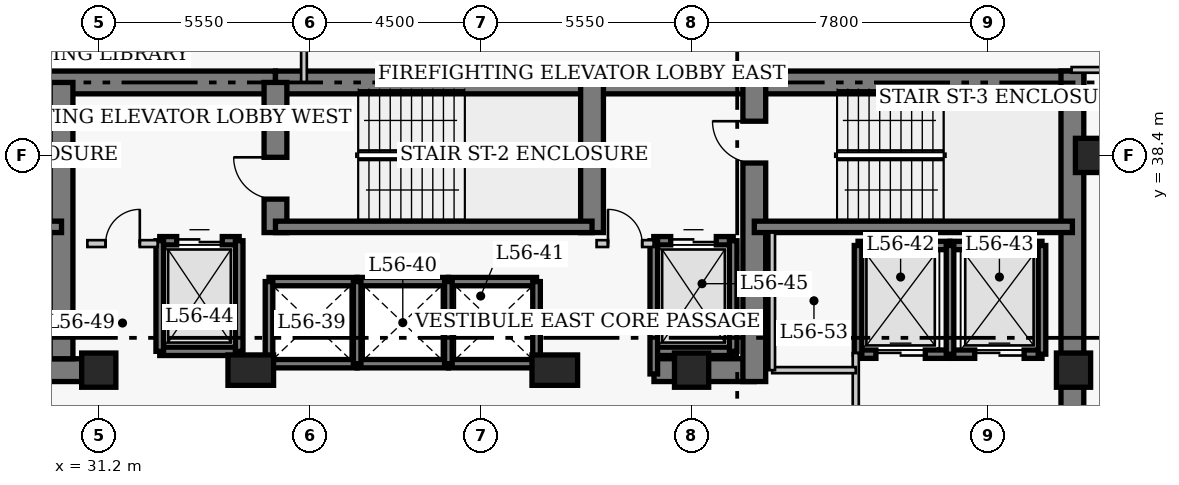
"""IFC4 building model, lengths in metres.
Left out: names, types, materials, properties, quantities, classifications, styles, units other than length and angle.
Written with IfcOpenShell. Run it as: python <this file> out.ifc"""

import sys

from ifc_helpers import new_model, si_unit, direction, frame, frame_2d, origin, origin_2d, place, context, subcontext, project, spatial, rectangle, extrude, element, fill, save


model = new_model("IFC4")
c1 = context("Model", 3, precision=1e-05, world=origin(), true_north=direction((0.0, 1.0)))
c2 = subcontext(c1, "Body", "Model", "MODEL_VIEW")
j1 = project(units=[si_unit("LENGTHUNIT", "METRE"), si_unit("PLANEANGLEUNIT", "RADIAN")], contexts=[c1])
p1 = place(None, origin())
s1 = spatial("IfcSite", under=j1, at=p1, CompositionType="ELEMENT")
p2 = place(p1, origin())
s2 = spatial("IfcBuilding", under=s1, at=p2, CompositionType="ELEMENT")
p3 = place(p2, frame((0.0, 0.0, 224.1)))
s3 = spatial("IfcBuildingStorey", under=s2, at=p3, CompositionType="ELEMENT", Elevation=224.1)
p4 = place(p3, frame((21.6, 40.32, 0.0), z_axis=(0.0, 0.0, 1.0), x_axis=(1.0, 0.0, 0.0)))
e1 = element("IfcWall", 1, at=p4, inside=s3, PredefinedType="SHEAR", context=c2, shape_type="SweptSolid", body=[
    extrude(rectangle(XDim=14.25, YDim=0.6, at=frame_2d((7.125, 0.0))), origin(), (0.0, 0.0, 1.0), 3.9),
])
p5 = place(p3, frame((35.85, 40.32, 0.0), z_axis=(0.0, 0.0, 1.0), x_axis=(1.0, 0.0, 0.0)))
e2 = element("IfcWall", 2, at=p5, inside=s3, PredefinedType="SHEAR", context=c2, shape_type="SweptSolid", body=[
    extrude(rectangle(XDim=12.6, YDim=0.6, at=frame_2d((6.3, 0.0))), origin(), (0.0, 0.0, 1.0), 3.9),
])
p6 = place(p3, frame((48.45, 40.32, 0.0), z_axis=(0.0, 0.0, 1.0), x_axis=(1.0, 0.0, 0.0)))
e3 = element("IfcWall", 3, at=p6, inside=s3, PredefinedType="SHEAR", context=c2, shape_type="SweptSolid", body=[
    extrude(rectangle(XDim=8.67, YDim=0.6, at=frame_2d((4.335, 0.0))), origin(), (0.0, 0.0, 1.0), 3.9),
])
p7 = place(p3, frame((56.82, 27.05, 0.0), z_axis=(0.0, 0.0, 1.0), x_axis=(0.0, 1.0, 0.0)))
e4 = element("IfcWall", 4, at=p7, inside=s3, PredefinedType="SHEAR", context=c2, shape_type="SweptSolid", body=[
    extrude(rectangle(XDim=13.57, YDim=0.6, at=frame_2d((6.785, 0.0))), origin(), (0.0, 0.0, 1.0), 3.9),
])
p8 = place(p3, frame((28.45, 32.75, 0.0), z_axis=(0.0, 0.0, 1.0), x_axis=(1.0, 0.0, 0.0)))
e5 = element("IfcWall", 5, at=p8, inside=s3, PredefinedType="SHEAR", context=c2, shape_type="SweptSolid", body=[
    extrude(rectangle(XDim=2.4, YDim=0.6, at=frame_2d((1.2, 0.0))), origin(), (0.0, 0.0, 1.0), 3.9),
])
p9 = place(p3, frame((45.81, 32.75, 0.0), z_axis=(0.0, 0.0, 1.0), x_axis=(1.0, 0.0, 0.0)))
e6 = element("IfcWall", 6, at=p9, inside=s3, PredefinedType="SHEAR", context=c2, shape_type="SweptSolid", body=[
    extrude(rectangle(XDim=2.64, YDim=0.6, at=frame_2d((1.32, 0.0))), origin(), (0.0, 0.0, 1.0), 3.9),
])
p10 = place(p3, frame((30.22, 33.05, 0.0), z_axis=(0.0, 0.0, 1.0), x_axis=(0.0, 1.0, 0.0)))
e7 = element("IfcWall", 7, at=p10, inside=s3, PredefinedType="SHEAR", context=c2, shape_type="SweptSolid", body=[
    extrude(rectangle(XDim=7.27, YDim=0.6, at=frame_2d((3.635, 0.0))), origin(), (0.0, 0.0, 1.0), 3.9),
])
p11 = place(p3, frame((35.85, 36.37, 0.0), z_axis=(0.0, 0.0, 1.0), x_axis=(0.0, 1.0, 0.0)))
e8 = element("IfcWall", 8, at=p11, inside=s3, PredefinedType="SHEAR", context=c2, shape_type="SweptSolid", body=[
    extrude(rectangle(XDim=3.95, YDim=0.6, at=frame_2d((1.975, 0.0))), origin(), (0.0, 0.0, 1.0), 3.9),
])
p12 = place(p11, frame((0.88, 0.0, 0.0)))
e9 = element("IfcOpeningElement", 9, at=p12, cuts=e8, PredefinedType="OPENING", context=c2, shape_type="SweptSolid", body=[
    extrude(rectangle(XDim=1.1, YDim=2.15, at=frame_2d((0.55, 1.075))), frame((0.0, 0.31, 0.0), z_axis=(0.0, -1.0, 0.0), x_axis=(1.0, 0.0, 0.0)), (0.0, 0.0, 1.0), 0.62),
])
p13 = place(p3, frame((44.18, 36.37, 0.0), z_axis=(0.0, 0.0, 1.0), x_axis=(0.0, 1.0, 0.0)))
e10 = element("IfcWall", 10, at=p13, inside=s3, PredefinedType="SHEAR", context=c2, shape_type="SweptSolid", body=[
    extrude(rectangle(XDim=3.95, YDim=0.6, at=frame_2d((1.975, 0.0))), origin(), (0.0, 0.0, 1.0), 3.9),
])
p14 = place(p3, frame((48.45, 32.45, 0.0), z_axis=(0.0, 0.0, 1.0), x_axis=(0.0, 1.0, 0.0)))
e11 = element("IfcWall", 11, at=p14, inside=s3, PredefinedType="SHEAR", context=c2, shape_type="SweptSolid", body=[
    extrude(rectangle(XDim=7.87, YDim=0.6, at=frame_2d((3.935, 0.0))), origin(), (0.0, 0.0, 1.0), 3.9),
])
p15 = place(p14, frame((5.75, 0.0, 0.0)))
e12 = element("IfcOpeningElement", 12, at=p15, cuts=e11, PredefinedType="OPENING", context=c2, shape_type="SweptSolid", body=[
    extrude(rectangle(XDim=1.1, YDim=2.15, at=frame_2d((0.55, 1.075))), frame((0.0, 0.31, 0.0), z_axis=(0.0, -1.0, 0.0), x_axis=(1.0, 0.0, 0.0)), (0.0, 0.0, 1.0), 0.62),
])
p16 = place(p3, frame((21.9, 36.52, 0.0), z_axis=(0.0, 0.0, 1.0), x_axis=(1.0, 0.0, 0.0)))
e13 = element("IfcWall", 13, at=p16, inside=s3, PredefinedType="SHEAR", context=c2, shape_type="SweptSolid", body=[
    extrude(rectangle(XDim=8.32, YDim=0.3, at=frame_2d((4.16, 0.0))), origin(), (0.0, 0.0, 1.0), 3.9),
])
p17 = place(p16, frame((0.9, 0.0, 0.0)))
e14 = element("IfcOpeningElement", 14, at=p17, cuts=e13, PredefinedType="OPENING", context=c2, shape_type="SweptSolid", body=[
    extrude(rectangle(XDim=1.1, YDim=2.15, at=frame_2d((0.55, 1.075))), frame((0.0, 0.16, 0.0), z_axis=(0.0, -1.0, 0.0), x_axis=(1.0, 0.0, 0.0)), (0.0, 0.0, 1.0), 0.32),
])
p18 = place(p3, frame((35.85, 36.52, 0.0), z_axis=(0.0, 0.0, 1.0), x_axis=(1.0, 0.0, 0.0)))
e15 = element("IfcWall", 15, at=p18, inside=s3, PredefinedType="SHEAR", context=c2, shape_type="SweptSolid", body=[
    extrude(rectangle(XDim=8.33, YDim=0.3, at=frame_2d((4.165, 0.0))), origin(), (0.0, 0.0, 1.0), 3.9),
])
p19 = place(p3, frame((48.45, 36.52, 0.0), z_axis=(0.0, 0.0, 1.0), x_axis=(1.0, 0.0, 0.0)))
e16 = element("IfcWall", 16, at=p19, inside=s3, PredefinedType="SHEAR", context=c2, shape_type="SweptSolid", body=[
    extrude(rectangle(XDim=8.37, YDim=0.3, at=frame_2d((4.185, 0.0))), origin(), (0.0, 0.0, 1.0), 3.9),
])
for number, where, z_axis, x_axis in (
    (17, (57.35, 38.4, 0.0), (0.0, 0.0, 1.0), (1.0, 0.0, 0.0)),
    (18, (31.2, 32.75, 0.0), (0.0, 0.0, 1.0), (1.0, 0.0, 0.0)),
):
    element("IfcColumn", number, at=place(p3, frame(where, z_axis=z_axis, x_axis=x_axis)), inside=s3, PredefinedType="COLUMN", context=c2, shape_type="SweptSolid", body=[
        extrude(rectangle(XDim=0.9, YDim=0.9, at=origin_2d()), origin(), (0.0, 0.0, 1.0), 3.9),
    ])
for number, where, z_axis, x_axis in (
    (19, (35.2, 32.75, 0.0), (0.0, 0.0, 1.0), (1.0, 0.0, 0.0)),
    (20, (43.2, 32.75, 0.0), (0.0, 0.0, 1.0), (1.0, 0.0, 0.0)),
):
    element("IfcColumn", number, at=place(p3, frame(where, z_axis=z_axis, x_axis=x_axis)), inside=s3, PredefinedType="COLUMN", context=c2, shape_type="SweptSolid", body=[
        extrude(rectangle(XDim=1.2, YDim=0.8, at=origin_2d()), origin(), (0.0, 0.0, 1.0), 3.9),
    ])
for number, where, z_axis, x_axis in (
    (21, (46.8, 32.75, 0.0), (0.0, 0.0, 1.0), (1.0, 0.0, 0.0)),
    (22, (56.85, 32.75, 0.0), (0.0, 0.0, 1.0), (1.0, 0.0, 0.0)),
):
    element("IfcColumn", number, at=place(p3, frame(where, z_axis=z_axis, x_axis=x_axis)), inside=s3, PredefinedType="COLUMN", context=c2, shape_type="SweptSolid", body=[
        extrude(rectangle(XDim=0.9, YDim=0.9, at=origin_2d()), origin(), (0.0, 0.0, 1.0), 3.9),
    ])
for number, where, z_axis, x_axis in (
    (23, (35.68, 35.08, 0.0), (0.0, 0.0, 1.0), (1.0, 0.0, 0.0)),
    (24, (35.68, 32.92, 0.0), (0.0, 0.0, 1.0), (1.0, 0.0, 0.0)),
):
    element("IfcWall", number, at=place(p3, frame(where, z_axis=z_axis, x_axis=x_axis)), inside=s3, PredefinedType="SHEAR", context=c2, shape_type="SweptSolid", body=[
        extrude(rectangle(XDim=2.32, YDim=0.22, at=frame_2d((1.16, 0.0))), origin(), (0.0, 0.0, 1.0), 3.9),
    ])
p20 = place(p3, frame((35.68, 32.92, 0.0), z_axis=(0.0, 0.0, 1.0), x_axis=(0.0, 1.0, 0.0)))
e25 = element("IfcWall", 25, at=p20, inside=s3, PredefinedType="SHEAR", context=c2, shape_type="SweptSolid", body=[
    extrude(rectangle(XDim=2.16, YDim=0.2, at=frame_2d((1.08, 0.0))), origin(), (0.0, 0.0, 1.0), 3.9),
])
for number, where, z_axis, x_axis in (
    (26, (38.0, 35.08, 0.0), (0.0, 0.0, 1.0), (1.0, 0.0, 0.0)),
    (27, (38.0, 32.92, 0.0), (0.0, 0.0, 1.0), (1.0, 0.0, 0.0)),
):
    element("IfcWall", number, at=place(p3, frame(where, z_axis=z_axis, x_axis=x_axis)), inside=s3, PredefinedType="SHEAR", context=c2, shape_type="SweptSolid", body=[
        extrude(rectangle(XDim=2.4, YDim=0.22, at=frame_2d((1.2, 0.0))), origin(), (0.0, 0.0, 1.0), 3.9),
    ])
p21 = place(p3, frame((38.0, 32.92, 0.0), z_axis=(0.0, 0.0, 1.0), x_axis=(0.0, 1.0, 0.0)))
e28 = element("IfcWall", 28, at=p21, inside=s3, PredefinedType="SHEAR", context=c2, shape_type="SweptSolid", body=[
    extrude(rectangle(XDim=2.16, YDim=0.2, at=frame_2d((1.08, 0.0))), origin(), (0.0, 0.0, 1.0), 3.9),
])
for number, where, z_axis, x_axis in (
    (29, (40.4, 35.08, 0.0), (0.0, 0.0, 1.0), (1.0, 0.0, 0.0)),
    (30, (40.4, 32.92, 0.0), (0.0, 0.0, 1.0), (1.0, 0.0, 0.0)),
):
    element("IfcWall", number, at=place(p3, frame(where, z_axis=z_axis, x_axis=x_axis)), inside=s3, PredefinedType="SHEAR", context=c2, shape_type="SweptSolid", body=[
        extrude(rectangle(XDim=2.32, YDim=0.22, at=frame_2d((1.16, 0.0))), origin(), (0.0, 0.0, 1.0), 3.9),
    ])
for number, where, z_axis, x_axis in (
    (31, (40.4, 32.92, 0.0), (0.0, 0.0, 1.0), (0.0, 1.0, 0.0)),
    (32, (42.72, 32.92, 0.0), (0.0, 0.0, 1.0), (0.0, 1.0, 0.0)),
):
    element("IfcWall", number, at=place(p3, frame(where, z_axis=z_axis, x_axis=x_axis)), inside=s3, PredefinedType="SHEAR", context=c2, shape_type="SweptSolid", body=[
        extrude(rectangle(XDim=2.16, YDim=0.2, at=frame_2d((1.08, 0.0))), origin(), (0.0, 0.0, 1.0), 3.9),
    ])
p22 = place(p3, frame((51.18, 36.03, 0.0), z_axis=(0.0, 0.0, 1.0), x_axis=(1.0, 0.0, 0.0)))
e33 = element("IfcWall", 33, at=p22, inside=s3, PredefinedType="SHEAR", context=c2, shape_type="SweptSolid", body=[
    extrude(rectangle(XDim=2.42, YDim=0.22, at=frame_2d((1.21, 0.0))), origin(), (0.0, 0.0, 1.0), 3.9),
])
p23 = place(p3, frame((51.18, 33.17, 0.0), z_axis=(0.0, 0.0, 1.0), x_axis=(1.0, 0.0, 0.0)))
e34 = element("IfcWall", 34, at=p23, inside=s3, PredefinedType="SHEAR", context=c2, shape_type="SweptSolid", body=[
    extrude(rectangle(XDim=2.42, YDim=0.22, at=frame_2d((1.21, 0.0))), origin(), (0.0, 0.0, 1.0), 3.9),
])
p24 = place(p23, frame((0.47, 0.0, 0.0)))
e35 = element("IfcOpeningElement", 35, at=p24, cuts=e34, PredefinedType="OPENING", context=c2, shape_type="SweptSolid", body=[
    extrude(rectangle(XDim=1.3, YDim=2.15, at=frame_2d((0.65, 1.075))), frame((0.0, 0.12, 0.0), z_axis=(0.0, -1.0, 0.0), x_axis=(1.0, 0.0, 0.0)), (0.0, 0.0, 1.0), 0.24),
])
p25 = place(p3, frame((51.18, 33.17, 0.0), z_axis=(0.0, 0.0, 1.0), x_axis=(0.0, 1.0, 0.0)))
e36 = element("IfcWall", 36, at=p25, inside=s3, PredefinedType="SHEAR", context=c2, shape_type="SweptSolid", body=[
    extrude(rectangle(XDim=2.86, YDim=0.2, at=frame_2d((1.43, 0.0))), origin(), (0.0, 0.0, 1.0), 3.9),
])
p26 = place(p3, frame((53.6, 36.03, 0.0), z_axis=(0.0, 0.0, 1.0), x_axis=(1.0, 0.0, 0.0)))
e37 = element("IfcWall", 37, at=p26, inside=s3, PredefinedType="SHEAR", context=c2, shape_type="SweptSolid", body=[
    extrude(rectangle(XDim=2.42, YDim=0.22, at=frame_2d((1.21, 0.0))), origin(), (0.0, 0.0, 1.0), 3.9),
])
p27 = place(p3, frame((53.6, 33.17, 0.0), z_axis=(0.0, 0.0, 1.0), x_axis=(1.0, 0.0, 0.0)))
e38 = element("IfcWall", 38, at=p27, inside=s3, PredefinedType="SHEAR", context=c2, shape_type="SweptSolid", body=[
    extrude(rectangle(XDim=2.42, YDim=0.22, at=frame_2d((1.21, 0.0))), origin(), (0.0, 0.0, 1.0), 3.9),
])
p28 = place(p27, frame((0.65, 0.0, 0.0)))
e39 = element("IfcOpeningElement", 39, at=p28, cuts=e38, PredefinedType="OPENING", context=c2, shape_type="SweptSolid", body=[
    extrude(rectangle(XDim=1.3, YDim=2.15, at=frame_2d((0.65, 1.075))), frame((0.0, 0.12, 0.0), z_axis=(0.0, -1.0, 0.0), x_axis=(1.0, 0.0, 0.0)), (0.0, 0.0, 1.0), 0.24),
])
for number, where, z_axis, x_axis in (
    (40, (53.6, 33.17, 0.0), (0.0, 0.0, 1.0), (0.0, 1.0, 0.0)),
    (41, (56.02, 33.17, 0.0), (0.0, 0.0, 1.0), (0.0, 1.0, 0.0)),
):
    element("IfcWall", number, at=place(p3, frame(where, z_axis=z_axis, x_axis=x_axis)), inside=s3, PredefinedType="SHEAR", context=c2, shape_type="SweptSolid", body=[
        extrude(rectangle(XDim=2.86, YDim=0.2, at=frame_2d((1.43, 0.0))), origin(), (0.0, 0.0, 1.0), 3.9),
    ])
p29 = place(p3, frame((32.805, 36.155, 0.0), z_axis=(0.0, 0.0, 1.0), x_axis=(1.0, 0.0, 0.0)))
e42 = element("IfcWall", 42, at=p29, inside=s3, PredefinedType="SHEAR", context=c2, shape_type="SweptSolid", body=[
    extrude(rectangle(XDim=2.09, YDim=0.22, at=frame_2d((1.045, 0.0))), origin(), (0.0, 0.0, 1.0), 3.9),
])
p30 = place(p29, frame((0.445, 0.0, 0.0)))
e43 = element("IfcOpeningElement", 43, at=p30, cuts=e42, PredefinedType="OPENING", context=c2, shape_type="SweptSolid", body=[
    extrude(rectangle(XDim=1.2, YDim=2.15, at=frame_2d((0.6, 1.075))), frame((0.0, 0.12, 0.0), z_axis=(0.0, -1.0, 0.0), x_axis=(1.0, 0.0, 0.0)), (0.0, 0.0, 1.0), 0.24),
])
p31 = place(p3, frame((32.805, 33.245, 0.0), z_axis=(0.0, 0.0, 1.0), x_axis=(1.0, 0.0, 0.0)))
e44 = element("IfcWall", 44, at=p31, inside=s3, PredefinedType="SHEAR", context=c2, shape_type="SweptSolid", body=[
    extrude(rectangle(XDim=2.09, YDim=0.22, at=frame_2d((1.045, 0.0))), origin(), (0.0, 0.0, 1.0), 3.9),
])
for number, where, z_axis, x_axis in (
    (45, (32.805, 33.245, 0.0), (0.0, 0.0, 1.0), (0.0, 1.0, 0.0)),
    (46, (34.895, 33.245, 0.0), (0.0, 0.0, 1.0), (0.0, 1.0, 0.0)),
):
    element("IfcWall", number, at=place(p3, frame(where, z_axis=z_axis, x_axis=x_axis)), inside=s3, PredefinedType="SHEAR", context=c2, shape_type="SweptSolid", body=[
        extrude(rectangle(XDim=2.91, YDim=0.2, at=frame_2d((1.455, 0.0))), origin(), (0.0, 0.0, 1.0), 3.9),
    ])
p32 = place(p3, frame((45.805, 36.155, 0.0), z_axis=(0.0, 0.0, 1.0), x_axis=(1.0, 0.0, 0.0)))
e47 = element("IfcWall", 47, at=p32, inside=s3, PredefinedType="SHEAR", context=c2, shape_type="SweptSolid", body=[
    extrude(rectangle(XDim=2.09, YDim=0.22, at=frame_2d((1.045, 0.0))), origin(), (0.0, 0.0, 1.0), 3.9),
])
p33 = place(p32, frame((0.445, 0.0, 0.0)))
e48 = element("IfcOpeningElement", 48, at=p33, cuts=e47, PredefinedType="OPENING", context=c2, shape_type="SweptSolid", body=[
    extrude(rectangle(XDim=1.2, YDim=2.15, at=frame_2d((0.6, 1.075))), frame((0.0, 0.12, 0.0), z_axis=(0.0, -1.0, 0.0), x_axis=(1.0, 0.0, 0.0)), (0.0, 0.0, 1.0), 0.24),
])
p34 = place(p3, frame((45.805, 33.245, 0.0), z_axis=(0.0, 0.0, 1.0), x_axis=(1.0, 0.0, 0.0)))
e49 = element("IfcWall", 49, at=p34, inside=s3, PredefinedType="SHEAR", context=c2, shape_type="SweptSolid", body=[
    extrude(rectangle(XDim=2.09, YDim=0.22, at=frame_2d((1.045, 0.0))), origin(), (0.0, 0.0, 1.0), 3.9),
])
p35 = place(p3, frame((45.805, 32.65, 0.0), z_axis=(0.0, 0.0, 1.0), x_axis=(0.0, 1.0, 0.0)))
e50 = element("IfcWall", 50, at=p35, inside=s3, PredefinedType="SHEAR", context=c2, shape_type="SweptSolid", body=[
    extrude(rectangle(XDim=3.505, YDim=0.2, at=frame_2d((1.752, 0.0))), origin(), (0.0, 0.0, 1.0), 3.9),
])
p36 = place(p3, frame((47.895, 33.245, 0.0), z_axis=(0.0, 0.0, 1.0), x_axis=(0.0, 1.0, 0.0)))
e51 = element("IfcWall", 51, at=p36, inside=s3, PredefinedType="SHEAR", context=c2, shape_type="SweptSolid", body=[
    extrude(rectangle(XDim=2.91, YDim=0.2, at=frame_2d((1.455, 0.0))), origin(), (0.0, 0.0, 1.0), 3.9),
])
p37 = place(p3, frame((30.9, 36.08, 0.0), z_axis=(0.0, 0.0, 1.0), x_axis=(1.0, 0.0, 0.0)))
e52 = element("IfcWall", 52, at=p37, inside=s3, PredefinedType="PARTITIONING", context=c2, shape_type="SweptSolid", body=[
    extrude(rectangle(XDim=1.85, YDim=0.18, at=frame_2d((0.925, 0.0))), origin(), (0.0, 0.0, 1.0), 3.65),
])
p38 = place(p37, frame((0.48, 0.0, 0.0)))
e53 = element("IfcOpeningElement", 53, at=p38, cuts=e52, PredefinedType="OPENING", context=c2, shape_type="SweptSolid", body=[
    extrude(rectangle(XDim=0.9, YDim=2.15, at=frame_2d((0.45, 1.075))), frame((0.0, 0.1, 0.0), z_axis=(0.0, -1.0, 0.0), x_axis=(1.0, 0.0, 0.0)), (0.0, 0.0, 1.0), 0.2),
])
p39 = place(p3, frame((44.3, 36.08, 0.0), z_axis=(0.0, 0.0, 1.0), x_axis=(1.0, 0.0, 0.0)))
e54 = element("IfcWall", 54, at=p39, inside=s3, PredefinedType="PARTITIONING", context=c2, shape_type="SweptSolid", body=[
    extrude(rectangle(XDim=1.5, YDim=0.18, at=frame_2d((0.75, 0.0))), origin(), (0.0, 0.0, 1.0), 3.65),
])
p40 = place(p39, frame((0.3, 0.0, 0.0)))
e55 = element("IfcOpeningElement", 55, at=p40, cuts=e54, PredefinedType="OPENING", context=c2, shape_type="SweptSolid", body=[
    extrude(rectangle(XDim=0.9, YDim=2.15, at=frame_2d((0.45, 1.075))), frame((0.0, 0.1, 0.0), z_axis=(0.0, -1.0, 0.0), x_axis=(1.0, 0.0, 0.0)), (0.0, 0.0, 1.0), 0.2),
])
p41 = place(p3, frame((51.12, 29.5, 0.0), z_axis=(0.0, 0.0, 1.0), x_axis=(0.0, 1.0, 0.0)))
e56 = element("IfcWall", 56, at=p41, inside=s3, PredefinedType="PARTITIONING", context=c2, shape_type="SweptSolid", body=[
    extrude(rectangle(XDim=3.7, YDim=0.16, at=frame_2d((1.85, 0.0))), origin(), (0.0, 0.0, 1.0), 3.65),
])
p42 = place(p41, frame((0.9, 0.0, 0.0)))
e57 = element("IfcOpeningElement", 57, at=p42, cuts=e56, PredefinedType="OPENING", context=c2, shape_type="SweptSolid", body=[
    extrude(rectangle(XDim=1.1, YDim=2.15, at=frame_2d((0.55, 1.075))), frame((0.0, 0.09, 0.0), z_axis=(0.0, -1.0, 0.0), x_axis=(1.0, 0.0, 0.0)), (0.0, 0.0, 1.0), 0.18),
])
p43 = place(p3, frame((48.92, 32.75, 0.0), z_axis=(0.0, 0.0, 1.0), x_axis=(1.0, 0.0, 0.0)))
e58 = element("IfcWall", 58, at=p43, inside=s3, PredefinedType="PARTITIONING", context=c2, shape_type="SweptSolid", body=[
    extrude(rectangle(XDim=2.2, YDim=0.16, at=frame_2d((1.1, 0.0))), origin(), (0.0, 0.0, 1.0), 3.65),
])
p44 = place(p3, frame((48.92, 32.75, 0.0), z_axis=(0.0, 0.0, 1.0), x_axis=(0.0, 1.0, 0.0)))
e59 = element("IfcWall", 59, at=p44, inside=s3, PredefinedType="PARTITIONING", context=c2, shape_type="SweptSolid", body=[
    extrude(rectangle(XDim=3.62, YDim=0.15, at=frame_2d((1.81, 0.0))), origin(), (0.0, 0.0, 1.0), 3.65),
])
p45 = place(p3, frame((56.8, 40.65, 0.0), z_axis=(0.0, 0.0, 1.0), x_axis=(1.0, 0.0, 0.0)))
e60 = element("IfcWall", 60, at=p45, inside=s3, PredefinedType="PARTITIONING", context=c2, shape_type="SweptSolid", body=[
    extrude(rectangle(XDim=4.36, YDim=0.15, at=frame_2d((2.18, 0.0))), origin(), (0.0, 0.0, 1.0), 3.65),
])
p46 = place(p45, frame((2.75, 0.0, 0.0)))
e61 = element("IfcOpeningElement", 61, at=p46, cuts=e60, PredefinedType="OPENING", context=c2, shape_type="SweptSolid", body=[
    extrude(rectangle(XDim=1.0, YDim=2.15, at=frame_2d((0.5, 1.075))), frame((0.0, 0.085, 0.0), z_axis=(0.0, -1.0, 0.0), x_axis=(1.0, 0.0, 0.0)), (0.0, 0.0, 1.0), 0.17),
])
p47 = place(p3, frame((36.6, 40.32, 0.0), z_axis=(0.0, 0.0, 1.0), x_axis=(0.0, 1.0, 0.0)))
e62 = element("IfcWall", 62, at=p47, inside=s3, PredefinedType="PARTITIONING", context=c2, shape_type="SweptSolid", body=[
    extrude(rectangle(XDim=2.345, YDim=0.15, at=frame_2d((1.172, 0.0))), origin(), (0.0, 0.0, 1.0), 3.65),
])
p48 = place(p24, origin())
e63 = element("IfcDoor", 63, at=p48, inside=s3, OperationType="DOUBLE_DOOR_SLIDING", PredefinedType="DOOR", context=c2, shape_type="SweptSolid", body=[
    extrude(rectangle(XDim=1.3, YDim=2.15, at=frame_2d((0.65, 1.075))), frame((0.0, 0.025, 0.0), z_axis=(0.0, -1.0, 0.0), x_axis=(1.0, 0.0, 0.0)), (0.0, 0.0, 1.0), 0.05),
])
fill(e35, e63)
p49 = place(p28, origin())
e64 = element("IfcDoor", 64, at=p49, inside=s3, OperationType="DOUBLE_DOOR_SLIDING", PredefinedType="DOOR", context=c2, shape_type="SweptSolid", body=[
    extrude(rectangle(XDim=1.3, YDim=2.15, at=frame_2d((0.65, 1.075))), frame((0.0, 0.025, 0.0), z_axis=(0.0, -1.0, 0.0), x_axis=(1.0, 0.0, 0.0)), (0.0, 0.0, 1.0), 0.05),
])
fill(e39, e64)
p50 = place(p30, origin())
e65 = element("IfcDoor", 65, at=p50, inside=s3, OperationType="DOUBLE_DOOR_SLIDING", PredefinedType="DOOR", context=c2, shape_type="SweptSolid", body=[
    extrude(rectangle(XDim=1.2, YDim=2.15, at=frame_2d((0.6, 1.075))), frame((0.0, 0.025, 0.0), z_axis=(0.0, -1.0, 0.0), x_axis=(1.0, 0.0, 0.0)), (0.0, 0.0, 1.0), 0.05),
])
fill(e43, e65)
p51 = place(p33, origin())
e66 = element("IfcDoor", 66, at=p51, inside=s3, OperationType="DOUBLE_DOOR_SLIDING", PredefinedType="DOOR", context=c2, shape_type="SweptSolid", body=[
    extrude(rectangle(XDim=1.2, YDim=2.15, at=frame_2d((0.6, 1.075))), frame((0.0, 0.025, 0.0), z_axis=(0.0, -1.0, 0.0), x_axis=(1.0, 0.0, 0.0)), (0.0, 0.0, 1.0), 0.05),
])
fill(e48, e66)
p52 = place(p38, origin())
e67 = element("IfcDoor", 67, at=p52, inside=s3, OperationType="SINGLE_SWING_RIGHT", PredefinedType="DOOR", context=c2, shape_type="SweptSolid", body=[
    extrude(rectangle(XDim=0.9, YDim=2.15, at=frame_2d((0.45, 1.075))), frame((0.0, 0.025, 0.0), z_axis=(0.0, -1.0, 0.0), x_axis=(1.0, 0.0, 0.0)), (0.0, 0.0, 1.0), 0.05),
])
fill(e53, e67)
p53 = place(p40, origin())
e68 = element("IfcDoor", 68, at=p53, inside=s3, OperationType="SINGLE_SWING_LEFT", PredefinedType="DOOR", context=c2, shape_type="SweptSolid", body=[
    extrude(rectangle(XDim=0.9, YDim=2.15, at=frame_2d((0.45, 1.075))), frame((0.0, 0.025, 0.0), z_axis=(0.0, -1.0, 0.0), x_axis=(1.0, 0.0, 0.0)), (0.0, 0.0, 1.0), 0.05),
])
fill(e55, e68)
p54 = place(p12, origin())
e69 = element("IfcDoor", 69, at=p54, inside=s3, OperationType="SINGLE_SWING_RIGHT", PredefinedType="DOOR", context=c2, shape_type="SweptSolid", body=[
    extrude(rectangle(XDim=1.1, YDim=2.15, at=frame_2d((0.55, 1.075))), frame((0.0, 0.025, 0.0), z_axis=(0.0, -1.0, 0.0), x_axis=(1.0, 0.0, 0.0)), (0.0, 0.0, 1.0), 0.05),
])
fill(e9, e69)
p55 = place(p15, origin())
e70 = element("IfcDoor", 70, at=p55, inside=s3, OperationType="SINGLE_SWING_RIGHT", PredefinedType="DOOR", context=c2, shape_type="SweptSolid", body=[
    extrude(rectangle(XDim=1.1, YDim=2.15, at=frame_2d((0.55, 1.075))), frame((0.0, 0.025, 0.0), z_axis=(0.0, -1.0, 0.0), x_axis=(1.0, 0.0, 0.0)), (0.0, 0.0, 1.0), 0.05),
])
fill(e12, e70)
save(model, sys.argv[1])
